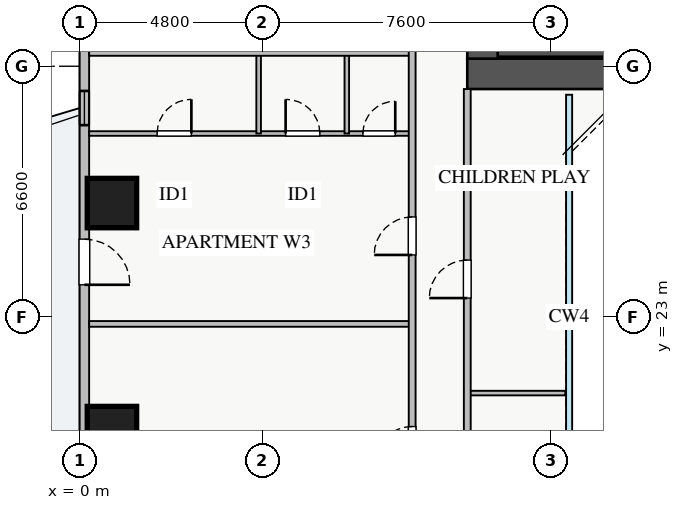
"""IFC4 building model, lengths in metres.
Left out: names, types, materials, properties, quantities, classifications, styles, units other than length and angle.
Written with IfcOpenShell. Run it as: python <this file> out.ifc"""

import sys

from ifc_helpers import new_model, si_unit, direction, frame, frame_2d, origin, origin_2d, place, context, subcontext, project, spatial, rectangle, extrude, source, transform, mapped, element, fill, save


model = new_model("IFC4")
c1 = context("Model", 3, precision=1e-05, world=origin(), true_north=direction((0.0, 1.0)))
c2 = subcontext(c1, "Body", "Model", "MODEL_VIEW")
j1 = project(units=[si_unit("LENGTHUNIT", "METRE"), si_unit("PLANEANGLEUNIT", "RADIAN")], contexts=[c1])
p1 = place(None, origin())
s1 = spatial("IfcSite", under=j1, at=p1, CompositionType="ELEMENT")
p2 = place(p1, origin())
s2 = spatial("IfcBuilding", under=s1, at=p2, CompositionType="ELEMENT")
p3 = place(p2, frame((0.0, 0.0, 60.0)))
s3 = spatial("IfcBuildingStorey", under=s2, at=p3, CompositionType="ELEMENT", Elevation=60.0)
p4 = place(p3, frame((11.0, 29.95, 0.0), z_axis=(0.0, 0.0, 1.0), x_axis=(1.0, 0.0, 0.0)))
e1 = element("IfcWall", 1, at=p4, inside=s3, PredefinedType="SHEAR", context=c2, shape_type="SweptSolid", body=[
    extrude(rectangle(XDim=7.15, YDim=0.2, at=frame_2d((3.575, 0.0))), origin(), (0.0, 0.0, 1.0), 3.25),
])
p5 = place(p3, frame((10.2, 29.4, 0.0), z_axis=(0.0, 0.0, 1.0), x_axis=(1.0, 0.0, 0.0)))
e2 = element("IfcWall", 2, at=p5, inside=s3, PredefinedType="SHEAR", context=c2, shape_type="SweptSolid", body=[
    extrude(rectangle(XDim=17.6, YDim=0.8, at=frame_2d((8.8, 0.0))), origin(), (0.0, 0.0, 1.0), 3.25),
])
p6 = place(p3, frame((10.6, 29.8, 0.0), z_axis=(0.0, 0.0, 1.0), x_axis=(0.0, 1.0, 0.0)))
e3 = element("IfcWall", 3, at=p6, inside=s3, PredefinedType="SHEAR", context=c2, shape_type="SweptSolid", body=[
    extrude(rectangle(XDim=5.6, YDim=0.8, at=frame_2d((2.8, 0.0))), origin(), (0.0, 0.0, 1.0), 3.25),
])
m1 = source(origin(), c2, "Body", "SweptSolid", [
    extrude(rectangle(XDim=1.3, YDim=1.3, at=origin_2d()), origin(), (0.0, 0.0, 1.0), 3.25),
])
for number, where, z_axis, x_axis in (
    (4, (0.85, 26.0, 0.0), (0.0, 0.0, 1.0), (1.0, 0.0, 0.0)),
    (5, (0.85, 20.0, 0.0), (0.0, 0.0, 1.0), (1.0, 0.0, 0.0)),
):
    element("IfcColumn", number, at=place(p3, frame(where, z_axis=z_axis, x_axis=x_axis)), inside=s3, PredefinedType="COLUMN", context=c2, shape_type="MappedRepresentation", body=[
        mapped(m1, transform((0.0, 0.0, 0.0), x_axis=(1.0, 0.0, 0.0), y_axis=(0.0, 1.0, 0.0), z_axis=(0.0, 0.0, 1.0), scale=1.0)),
    ])
p7 = place(p3, frame((0.125, 9.45, 0.0), z_axis=(0.0, 0.0, 1.0), x_axis=(0.0, 1.0, 0.0)))
e6 = element("IfcWall", 6, at=p7, inside=s3, PredefinedType="STANDARD", context=c2, shape_type="SweptSolid", body=[
    extrude(rectangle(XDim=27.1, YDim=0.25, at=frame_2d((13.55, 0.0))), origin(), (0.0, 0.0, 1.0), 2.61),
])
p8 = place(p7, frame((14.4, 0.0, 0.0)))
e7 = element("IfcOpeningElement", 7, at=p8, cuts=e6, PredefinedType="OPENING", context=c2, shape_type="SweptSolid", body=[
    extrude(rectangle(XDim=1.2, YDim=2.1, at=frame_2d((0.6, 1.05))), frame((0.0, 0.135, 0.0), z_axis=(0.0, -1.0, 0.0), x_axis=(1.0, 0.0, 0.0)), (0.0, 0.0, 1.0), 0.27),
])
p9 = place(p7, frame((1.417, 0.0, 0.9)))
e8 = element("IfcOpeningElement", 8, at=p9, cuts=e6, PredefinedType="OPENING", context=c2, shape_type="SweptSolid", body=[
    extrude(rectangle(XDim=1.2, YDim=1.4, at=frame_2d((0.6, 0.7))), frame((0.0, 0.135, 0.0), z_axis=(0.0, -1.0, 0.0), x_axis=(1.0, 0.0, 0.0)), (0.0, 0.0, 1.0), 0.27),
])
p10 = place(p7, frame((24.188, 0.0, 0.9)))
e9 = element("IfcOpeningElement", 9, at=p10, cuts=e6, PredefinedType="OPENING", context=c2, shape_type="SweptSolid", body=[
    extrude(rectangle(XDim=1.5, YDim=1.5, at=frame_2d((0.75, 0.75))), frame((0.0, 0.135, 0.0), z_axis=(0.0, -1.0, 0.0), x_axis=(1.0, 0.0, 0.0)), (0.0, 0.0, 1.0), 0.27),
])
p11 = place(p7, frame((3.722, 0.0, 0.9)))
e10 = element("IfcOpeningElement", 10, at=p11, cuts=e6, PredefinedType="OPENING", context=c2, shape_type="SweptSolid", body=[
    extrude(rectangle(XDim=2.4, YDim=1.5, at=frame_2d((1.2, 0.75))), frame((0.0, 0.135, 0.0), z_axis=(0.0, -1.0, 0.0), x_axis=(1.0, 0.0, 0.0)), (0.0, 0.0, 1.0), 0.27),
])
p12 = place(p7, frame((21.018, 0.0, 0.9)))
e11 = element("IfcOpeningElement", 11, at=p12, cuts=e6, PredefinedType="OPENING", context=c2, shape_type="SweptSolid", body=[
    extrude(rectangle(XDim=2.4, YDim=1.5, at=frame_2d((1.2, 0.75))), frame((0.0, 0.135, 0.0), z_axis=(0.0, -1.0, 0.0), x_axis=(1.0, 0.0, 0.0)), (0.0, 0.0, 1.0), 0.27),
])
p13 = place(p7, frame((18.6, 0.0, 0.9)))
e12 = element("IfcOpeningElement", 12, at=p13, cuts=e6, PredefinedType="OPENING", context=c2, shape_type="SweptSolid", body=[
    extrude(rectangle(XDim=0.9, YDim=1.2, at=frame_2d((0.45, 0.6))), frame((0.0, 0.135, 0.0), z_axis=(0.0, -1.0, 0.0), x_axis=(1.0, 0.0, 0.0)), (0.0, 0.0, 1.0), 0.27),
])
p14 = place(p3, frame((0.25, 27.83, 0.0), z_axis=(0.0, 0.0, 1.0), x_axis=(1.0, 0.0, 0.0)))
e13 = element("IfcWall", 13, at=p14, inside=s3, PredefinedType="PLUMBINGWALL", context=c2, shape_type="SweptSolid", body=[
    extrude(rectangle(XDim=8.5, YDim=0.12, at=frame_2d((4.25, 0.0))), origin(), (0.0, 0.0, 1.0), 2.765),
])
p15 = place(p14, frame((1.79, 0.0, 0.0)))
e14 = element("IfcOpeningElement", 14, at=p15, cuts=e13, PredefinedType="OPENING", context=c2, shape_type="SweptSolid", body=[
    extrude(rectangle(XDim=0.9, YDim=2.05, at=frame_2d((0.45, 1.025))), frame((0.0, 0.07, 0.0), z_axis=(0.0, -1.0, 0.0), x_axis=(1.0, 0.0, 0.0)), (0.0, 0.0, 1.0), 0.14),
])
p16 = place(p14, frame((5.17, 0.0, 0.0)))
e15 = element("IfcOpeningElement", 15, at=p16, cuts=e13, PredefinedType="OPENING", context=c2, shape_type="SweptSolid", body=[
    extrude(rectangle(XDim=0.9, YDim=2.05, at=frame_2d((0.45, 1.025))), frame((0.0, 0.07, 0.0), z_axis=(0.0, -1.0, 0.0), x_axis=(1.0, 0.0, 0.0)), (0.0, 0.0, 1.0), 0.14),
])
p17 = place(p14, frame((7.205, 0.0, 0.0)))
e16 = element("IfcOpeningElement", 16, at=p17, cuts=e13, PredefinedType="OPENING", context=c2, shape_type="SweptSolid", body=[
    extrude(rectangle(XDim=0.85, YDim=2.05, at=frame_2d((0.425, 1.025))), frame((0.0, 0.07, 0.0), z_axis=(0.0, -1.0, 0.0), x_axis=(1.0, 0.0, 0.0)), (0.0, 0.0, 1.0), 0.14),
])
for number, where, z_axis, x_axis in (
    (17, (4.71, 27.83, 0.0), (0.0, 0.0, 1.0), (0.0, 1.0, 0.0)),
    (18, (7.03, 27.83, 0.0), (0.0, 0.0, 1.0), (0.0, 1.0, 0.0)),
):
    element("IfcWall", number, at=place(p3, frame(where, z_axis=z_axis, x_axis=x_axis)), inside=s3, PredefinedType="PLUMBINGWALL", context=c2, shape_type="SweptSolid", body=[
        extrude(rectangle(XDim=2.12, YDim=0.12, at=frame_2d((1.06, 0.0))), origin(), (0.0, 0.0, 1.0), 3.07),
    ])
for number, where, z_axis, x_axis in (
    (19, (0.25, 22.82, 0.0), (0.0, 0.0, 1.0), (1.0, 0.0, 0.0)),
    (20, (0.25, 29.95, 0.0), (0.0, 0.0, 1.0), (1.0, 0.0, 0.0)),
):
    element("IfcWall", number, at=place(p3, frame(where, z_axis=z_axis, x_axis=x_axis)), inside=s3, PredefinedType="PARTITIONING", context=c2, shape_type="SweptSolid", body=[
        extrude(rectangle(XDim=8.5, YDim=0.15, at=frame_2d((4.25, 0.0))), origin(), (0.0, 0.0, 1.0), 3.07),
    ])
p18 = place(p3, frame((8.75, 7.21, 0.0), z_axis=(0.0, 0.0, 1.0), x_axis=(0.0, 1.0, 0.0)))
e21 = element("IfcWall", 21, at=p18, inside=s3, PredefinedType="PARTITIONING", context=c2, shape_type="SweptSolid", body=[
    extrude(rectangle(XDim=31.23, YDim=0.18, at=frame_2d((15.615, 0.0))), origin(), (0.0, 0.0, 1.0), 3.07),
])
p19 = place(p18, frame((30.09, 0.0, 0.0)))
e22 = element("IfcOpeningElement", 22, at=p19, cuts=e21, PredefinedType="OPENING", context=c2, shape_type="SweptSolid", body=[
    extrude(rectangle(XDim=0.9, YDim=2.05, at=frame_2d((0.45, 1.025))), frame((0.0, 0.1, 0.0), z_axis=(0.0, -1.0, 0.0), x_axis=(1.0, 0.0, 0.0)), (0.0, 0.0, 1.0), 0.2),
])
p20 = place(p18, frame((0.24, 0.0, 0.0)))
e23 = element("IfcOpeningElement", 23, at=p20, cuts=e21, PredefinedType="OPENING", context=c2, shape_type="SweptSolid", body=[
    extrude(rectangle(XDim=0.9, YDim=2.05, at=frame_2d((0.45, 1.025))), frame((0.0, 0.1, 0.0), z_axis=(0.0, -1.0, 0.0), x_axis=(1.0, 0.0, 0.0)), (0.0, 0.0, 1.0), 0.2),
])
p21 = place(p18, frame((2.555, 0.0, 0.0)))
e24 = element("IfcOpeningElement", 24, at=p21, cuts=e21, PredefinedType="OPENING", context=c2, shape_type="SweptSolid", body=[
    extrude(rectangle(XDim=1.0, YDim=2.05, at=frame_2d((0.5, 1.025))), frame((0.0, 0.1, 0.0), z_axis=(0.0, -1.0, 0.0), x_axis=(1.0, 0.0, 0.0)), (0.0, 0.0, 1.0), 0.2),
])
p22 = place(p18, frame((11.91, 0.0, 0.0)))
e25 = element("IfcOpeningElement", 25, at=p22, cuts=e21, PredefinedType="OPENING", context=c2, shape_type="SweptSolid", body=[
    extrude(rectangle(XDim=1.0, YDim=2.05, at=frame_2d((0.5, 1.025))), frame((0.0, 0.1, 0.0), z_axis=(0.0, -1.0, 0.0), x_axis=(1.0, 0.0, 0.0)), (0.0, 0.0, 1.0), 0.2),
])
p23 = place(p18, frame((17.425, 0.0, 0.0)))
e26 = element("IfcOpeningElement", 26, at=p23, cuts=e21, PredefinedType="OPENING", context=c2, shape_type="SweptSolid", body=[
    extrude(rectangle(XDim=1.0, YDim=2.05, at=frame_2d((0.5, 1.025))), frame((0.0, 0.1, 0.0), z_axis=(0.0, -1.0, 0.0), x_axis=(1.0, 0.0, 0.0)), (0.0, 0.0, 1.0), 0.2),
])
p24 = place(p18, frame((23.76, 0.0, 0.0)))
e27 = element("IfcOpeningElement", 27, at=p24, cuts=e21, PredefinedType="OPENING", context=c2, shape_type="SweptSolid", body=[
    extrude(rectangle(XDim=1.0, YDim=2.05, at=frame_2d((0.5, 1.025))), frame((0.0, 0.1, 0.0), z_axis=(0.0, -1.0, 0.0), x_axis=(1.0, 0.0, 0.0)), (0.0, 0.0, 1.0), 0.2),
])
p25 = place(p3, frame((10.2, 21.0, 0.0), z_axis=(0.0, 0.0, 1.0), x_axis=(1.0, 0.0, 0.0)))
e28 = element("IfcWall", 28, at=p25, inside=s3, PredefinedType="PLUMBINGWALL", context=c2, shape_type="SweptSolid", body=[
    extrude(rectangle(XDim=2.58, YDim=0.12, at=frame_2d((1.29, 0.0))), origin(), (0.0, 0.0, 1.0), 3.07),
])
p26 = place(p3, frame((10.2, 17.0, 0.0), z_axis=(0.0, 0.0, 1.0), x_axis=(0.0, 1.0, 0.0)))
e29 = element("IfcWall", 29, at=p26, inside=s3, PredefinedType="PARTITIONING", context=c2, shape_type="SweptSolid", body=[
    extrude(rectangle(XDim=12.0, YDim=0.18, at=frame_2d((6.0, 0.0))), origin(), (0.0, 0.0, 1.0), 3.07),
])
p27 = place(p26, frame((1.5, 0.0, 0.0)))
e30 = element("IfcOpeningElement", 30, at=p27, cuts=e29, PredefinedType="OPENING", context=c2, shape_type="SweptSolid", body=[
    extrude(rectangle(XDim=0.85, YDim=2.05, at=frame_2d((0.425, 1.025))), frame((0.0, 0.1, 0.0), z_axis=(0.0, -1.0, 0.0), x_axis=(1.0, 0.0, 0.0)), (0.0, 0.0, 1.0), 0.2),
])
p28 = place(p26, frame((6.5, 0.0, 0.0)))
e31 = element("IfcOpeningElement", 31, at=p28, cuts=e29, PredefinedType="OPENING", context=c2, shape_type="SweptSolid", body=[
    extrude(rectangle(XDim=1.0, YDim=2.05, at=frame_2d((0.5, 1.025))), frame((0.0, 0.1, 0.0), z_axis=(0.0, -1.0, 0.0), x_axis=(1.0, 0.0, 0.0)), (0.0, 0.0, 1.0), 0.2),
])
m2 = source(origin(), c2, "Body", "SweptSolid", [
    extrude(rectangle(XDim=1.2, YDim=2.1, at=frame_2d((0.6, 1.05))), frame((0.0, 0.025, 0.0), z_axis=(0.0, -1.0, 0.0), x_axis=(1.0, 0.0, 0.0)), (0.0, 0.0, 1.0), 0.05),
])
p29 = place(p8, frame((1.2, 0.0, 0.0), z_axis=(0.0, 0.0, 1.0), x_axis=(-1.0, 0.0, 0.0)))
e32 = element("IfcDoor", 32, at=p29, inside=s3, OperationType="SINGLE_SWING_LEFT", PredefinedType="DOOR", context=c2, shape_type="MappedRepresentation", body=[
    mapped(m2, transform((0.0, 0.0, 0.0), x_axis=(1.0, 0.0, 0.0), y_axis=(0.0, 1.0, 0.0), z_axis=(0.0, 0.0, 1.0), scale=1.0)),
])
fill(e7, e32)
m3 = source(origin(), c2, "Body", "SweptSolid", [
    extrude(rectangle(XDim=0.9, YDim=2.05, at=frame_2d((0.45, 1.025))), frame((0.0, 0.025, 0.0), z_axis=(0.0, -1.0, 0.0), x_axis=(1.0, 0.0, 0.0)), (0.0, 0.0, 1.0), 0.05),
])
p30 = place(p15, origin())
e33 = element("IfcDoor", 33, at=p30, inside=s3, OperationType="SINGLE_SWING_RIGHT", PredefinedType="DOOR", context=c2, shape_type="MappedRepresentation", body=[
    mapped(m3, transform((0.0, 0.0, 0.0), x_axis=(1.0, 0.0, 0.0), y_axis=(0.0, 1.0, 0.0), z_axis=(0.0, 0.0, 1.0), scale=1.0)),
])
fill(e14, e33)
p31 = place(p16, origin())
e34 = element("IfcDoor", 34, at=p31, inside=s3, OperationType="SINGLE_SWING_LEFT", PredefinedType="DOOR", context=c2, shape_type="MappedRepresentation", body=[
    mapped(m3, transform((0.0, 0.0, 0.0), x_axis=(1.0, 0.0, 0.0), y_axis=(0.0, 1.0, 0.0), z_axis=(0.0, 0.0, 1.0), scale=1.0)),
])
fill(e15, e34)
m4 = source(origin(), c2, "Body", "SweptSolid", [
    extrude(rectangle(XDim=0.85, YDim=2.05, at=frame_2d((0.425, 1.025))), frame((0.0, 0.025, 0.0), z_axis=(0.0, -1.0, 0.0), x_axis=(1.0, 0.0, 0.0)), (0.0, 0.0, 1.0), 0.05),
])
p32 = place(p17, origin())
e35 = element("IfcDoor", 35, at=p32, inside=s3, OperationType="SINGLE_SWING_RIGHT", PredefinedType="DOOR", context=c2, shape_type="MappedRepresentation", body=[
    mapped(m4, transform((0.0, 0.0, 0.0), x_axis=(1.0, 0.0, 0.0), y_axis=(0.0, 1.0, 0.0), z_axis=(0.0, 0.0, 1.0), scale=1.0)),
])
fill(e16, e35)
m5 = source(origin(), c2, "Body", "SweptSolid", [
    extrude(rectangle(XDim=1.0, YDim=2.05, at=frame_2d((0.5, 1.025))), frame((0.0, 0.025, 0.0), z_axis=(0.0, -1.0, 0.0), x_axis=(1.0, 0.0, 0.0)), (0.0, 0.0, 1.0), 0.05),
])
p33 = place(p22, origin())
e36 = element("IfcDoor", 36, at=p33, inside=s3, OperationType="SINGLE_SWING_LEFT", PredefinedType="DOOR", context=c2, shape_type="MappedRepresentation", body=[
    mapped(m5, transform((0.0, 0.0, 0.0), x_axis=(1.0, 0.0, 0.0), y_axis=(0.0, 1.0, 0.0), z_axis=(0.0, 0.0, 1.0), scale=1.0)),
])
fill(e25, e36)
p34 = place(p23, origin())
e37 = element("IfcDoor", 37, at=p34, inside=s3, OperationType="SINGLE_SWING_LEFT", PredefinedType="DOOR", context=c2, shape_type="MappedRepresentation", body=[
    mapped(m5, transform((0.0, 0.0, 0.0), x_axis=(1.0, 0.0, 0.0), y_axis=(0.0, 1.0, 0.0), z_axis=(0.0, 0.0, 1.0), scale=1.0)),
])
fill(e26, e37)
p35 = place(p28, origin())
e38 = element("IfcDoor", 38, at=p35, inside=s3, OperationType="SINGLE_SWING_LEFT", PredefinedType="DOOR", context=c2, shape_type="MappedRepresentation", body=[
    mapped(m5, transform((0.0, 0.0, 0.0), x_axis=(1.0, 0.0, 0.0), y_axis=(0.0, 1.0, 0.0), z_axis=(0.0, 0.0, 1.0), scale=1.0)),
])
fill(e31, e38)
m6 = source(origin(), c2, "Body", "SweptSolid", [
    extrude(rectangle(XDim=0.9, YDim=1.2, at=frame_2d((0.45, 0.6))), frame((0.0, 0.03, 0.0), z_axis=(0.0, -1.0, 0.0), x_axis=(1.0, 0.0, 0.0)), (0.0, 0.0, 1.0), 0.06),
])
p36 = place(p13, origin())
e39 = element("IfcWindow", 39, at=p36, inside=s3, PartitioningType="SINGLE_PANEL", PredefinedType="WINDOW", context=c2, shape_type="MappedRepresentation", body=[
    mapped(m6, transform((0.0, 0.0, 0.0), x_axis=(1.0, 0.0, 0.0), y_axis=(0.0, 1.0, 0.0), z_axis=(0.0, 0.0, 1.0), scale=1.0)),
])
fill(e12, e39)
save(model, sys.argv[1])
